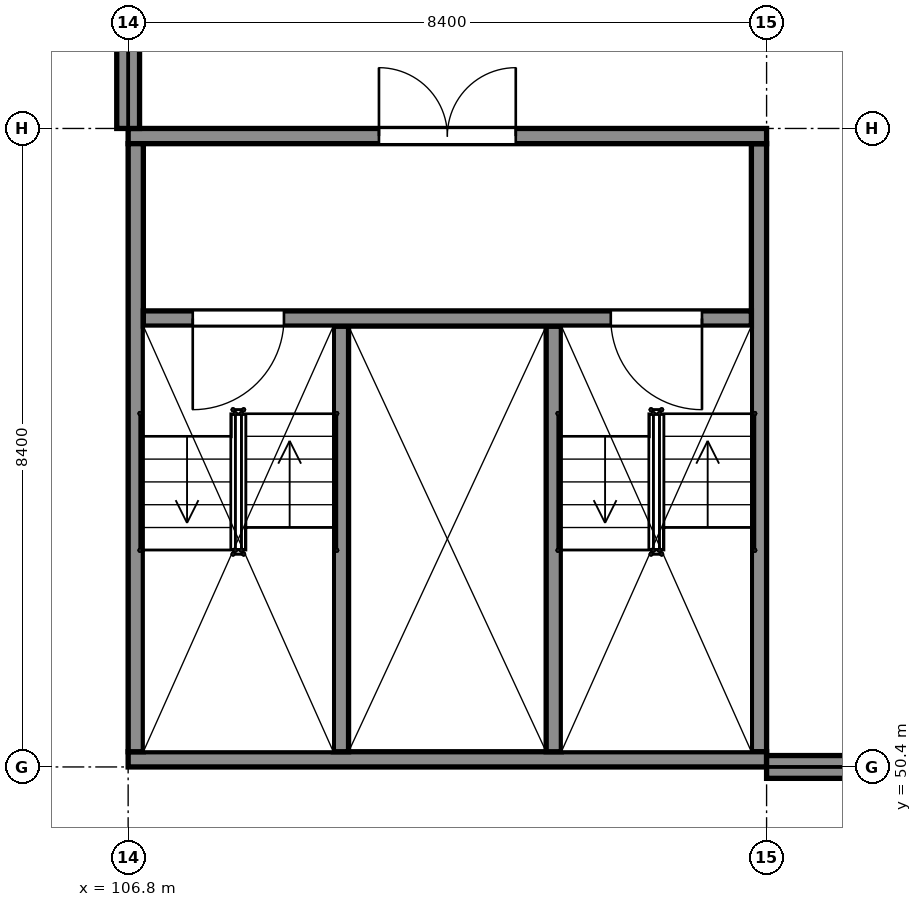
"""IFC4 building model, lengths in metres.
Left out: names, types, materials, properties, quantities, classifications, styles, units other than length and angle.
Written with IfcOpenShell. Run it as: python <this file> out.ifc"""

import sys

from ifc_helpers import new_model, si_unit, direction, frame, frame_2d, origin, place, context, subcontext, project, spatial, rectangle, extrude, element, fill, save


model = new_model("IFC4")
c1 = context("Model", 3, precision=1e-05, world=origin(), true_north=direction((0.0, 1.0)))
c2 = subcontext(c1, "Body", "Model", "MODEL_VIEW")
j1 = project(units=[si_unit("LENGTHUNIT", "METRE"), si_unit("PLANEANGLEUNIT", "RADIAN")], contexts=[c1])
p1 = place(None, origin())
s1 = spatial("IfcSite", under=j1, at=p1, CompositionType="ELEMENT")
p2 = place(p1, origin())
s2 = spatial("IfcBuilding", under=s1, at=p2, CompositionType="ELEMENT")
p3 = place(p2, frame((0.0, 0.0, 20.0)))
s3 = spatial("IfcBuildingStorey", under=s2, at=p3, CompositionType="ELEMENT", Elevation=20.0)
p4 = place(p3, frame((106.8, 50.5, 0.0), z_axis=(0.0, 0.0, 1.0), x_axis=(1.0, 0.0, 0.0)))
e1 = element("IfcWall", 1, at=p4, inside=s3, PredefinedType="SHEAR", context=c2, shape_type="SweptSolid", body=[
    extrude(rectangle(XDim=8.4, YDim=0.2, at=frame_2d((4.2, 0.0))), origin(), (0.0, 0.0, 1.0), 5.0),
])
p5 = place(p3, frame((106.8, 58.7, 0.0), z_axis=(0.0, 0.0, 1.0), x_axis=(1.0, 0.0, 0.0)))
e2 = element("IfcWall", 2, at=p5, inside=s3, PredefinedType="SHEAR", context=c2, shape_type="SweptSolid", body=[
    extrude(rectangle(XDim=8.4, YDim=0.2, at=frame_2d((4.2, 0.0))), origin(), (0.0, 0.0, 1.0), 5.0),
])
p6 = place(p5, frame((3.3, 0.0, 0.0)))
e3 = element("IfcOpeningElement", 3, at=p6, cuts=e2, PredefinedType="OPENING", context=c2, shape_type="SweptSolid", body=[
    extrude(rectangle(XDim=1.8, YDim=2.1, at=frame_2d((0.9, 1.05))), frame((0.0, 0.11, 0.0), z_axis=(0.0, -1.0, 0.0), x_axis=(1.0, 0.0, 0.0)), (0.0, 0.0, 1.0), 0.22),
])
for number, where, z_axis, x_axis in (
    (4, (106.9, 50.6, 0.0), (0.0, 0.0, 1.0), (0.0, 1.0, 0.0)),
    (5, (115.1, 50.6, 0.0), (0.0, 0.0, 1.0), (0.0, 1.0, 0.0)),
):
    element("IfcWall", number, at=place(p3, frame(where, z_axis=z_axis, x_axis=x_axis)), inside=s3, PredefinedType="SHEAR", context=c2, shape_type="SweptSolid", body=[
        extrude(rectangle(XDim=8.0, YDim=0.2, at=frame_2d((4.0, 0.0))), origin(), (0.0, 0.0, 1.0), 5.0),
    ])
p7 = place(p3, frame((107.0, 56.3, 0.0), z_axis=(0.0, 0.0, 1.0), x_axis=(1.0, 0.0, 0.0)))
e6 = element("IfcWall", 6, at=p7, inside=s3, PredefinedType="SHEAR", context=c2, shape_type="SweptSolid", body=[
    extrude(rectangle(XDim=8.0, YDim=0.2, at=frame_2d((4.0, 0.0))), origin(), (0.0, 0.0, 1.0), 5.0),
])
p8 = place(p7, frame((0.65, 0.0, 0.0)))
e7 = element("IfcOpeningElement", 7, at=p8, cuts=e6, PredefinedType="OPENING", context=c2, shape_type="SweptSolid", body=[
    extrude(rectangle(XDim=1.2, YDim=2.1, at=frame_2d((0.6, 1.05))), frame((0.0, 0.11, 0.0), z_axis=(0.0, -1.0, 0.0), x_axis=(1.0, 0.0, 0.0)), (0.0, 0.0, 1.0), 0.22),
])
p9 = place(p7, frame((6.15, 0.0, 0.0)))
e8 = element("IfcOpeningElement", 8, at=p9, cuts=e6, PredefinedType="OPENING", context=c2, shape_type="SweptSolid", body=[
    extrude(rectangle(XDim=1.2, YDim=2.1, at=frame_2d((0.6, 1.05))), frame((0.0, 0.11, 0.0), z_axis=(0.0, -1.0, 0.0), x_axis=(1.0, 0.0, 0.0)), (0.0, 0.0, 1.0), 0.22),
])
for number, where, z_axis, x_axis in (
    (9, (109.6, 50.6, 0.0), (0.0, 0.0, 1.0), (0.0, 1.0, 0.0)),
    (10, (112.4, 50.6, 0.0), (0.0, 0.0, 1.0), (0.0, 1.0, 0.0)),
):
    element("IfcWall", number, at=place(p3, frame(where, z_axis=z_axis, x_axis=x_axis)), inside=s3, PredefinedType="SHEAR", context=c2, shape_type="SweptSolid", body=[
        extrude(rectangle(XDim=5.6, YDim=0.2, at=frame_2d((2.8, 0.0))), origin(), (0.0, 0.0, 1.0), 5.0),
    ])
p10 = place(p3, frame((115.2, 50.4, 0.0), z_axis=(0.0, 0.0, 1.0), x_axis=(1.0, 0.0, 0.0)))
e11 = element("IfcWall", 11, at=p10, inside=s3, PredefinedType="SOLIDWALL", context=c2, shape_type="SweptSolid", body=[
    extrude(rectangle(XDim=8.05, YDim=0.3, at=frame_2d((4.025, 0.0))), origin(), (0.0, 0.0, 1.0), 3.94),
])
p11 = place(p3, frame((106.8, 58.8, 0.0), z_axis=(0.0, 0.0, 1.0), x_axis=(0.0, 1.0, 0.0)))
e12 = element("IfcWall", 12, at=p11, inside=s3, PredefinedType="SOLIDWALL", context=c2, shape_type="SweptSolid", body=[
    extrude(rectangle(XDim=8.4, YDim=0.3, at=frame_2d((4.2, 0.0))), origin(), (0.0, 0.0, 1.0), 3.94),
])
p12 = place(p6, origin())
e13 = element("IfcDoor", 13, at=p12, inside=s3, OperationType="DOUBLE_DOOR_SINGLE_SWING", PredefinedType="DOOR", context=c2, shape_type="SweptSolid", body=[
    extrude(rectangle(XDim=1.8, YDim=2.1, at=frame_2d((0.9, 1.05))), frame((0.0, 0.025, 0.0), z_axis=(0.0, -1.0, 0.0), x_axis=(1.0, 0.0, 0.0)), (0.0, 0.0, 1.0), 0.05),
])
fill(e3, e13)
p13 = place(p8, origin())
e14 = element("IfcDoor", 14, at=p13, inside=s3, OperationType="SINGLE_SWING_LEFT", PredefinedType="DOOR", context=c2, shape_type="SweptSolid", body=[
    extrude(rectangle(XDim=1.2, YDim=2.1, at=frame_2d((0.6, 1.05))), frame((0.0, 0.025, 0.0), z_axis=(0.0, -1.0, 0.0), x_axis=(1.0, 0.0, 0.0)), (0.0, 0.0, 1.0), 0.05),
])
fill(e7, e14)
p14 = place(p9, origin())
e15 = element("IfcDoor", 15, at=p14, inside=s3, OperationType="SINGLE_SWING_RIGHT", PredefinedType="DOOR", context=c2, shape_type="SweptSolid", body=[
    extrude(rectangle(XDim=1.2, YDim=2.1, at=frame_2d((0.6, 1.05))), frame((0.0, 0.025, 0.0), z_axis=(0.0, -1.0, 0.0), x_axis=(1.0, 0.0, 0.0)), (0.0, 0.0, 1.0), 0.05),
])
fill(e8, e15)
save(model, sys.argv[1])
